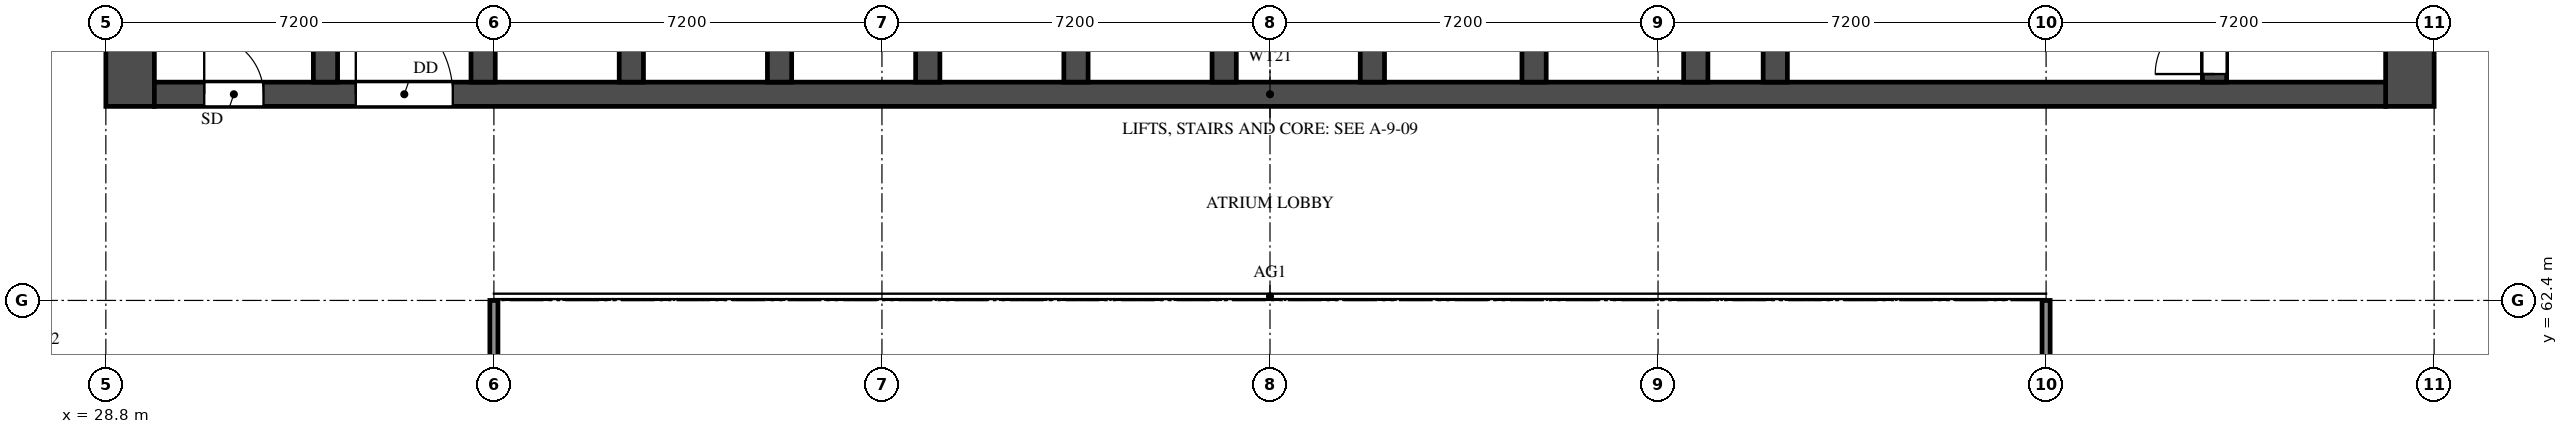
"""IFC4 building model, lengths in metres.
Left out: names, types, materials, properties, quantities, classifications, styles, units other than length and angle.
Written with IfcOpenShell. Run it as: python <this file> out.ifc"""

import sys

from ifc_helpers import new_model, si_unit, direction, frame, frame_2d, origin, place, context, subcontext, project, spatial, rectangle, extrude, element, fill, save


model = new_model("IFC4")
c1 = context("Model", 3, precision=1e-05, world=origin(), true_north=direction((0.0, 1.0)))
c2 = subcontext(c1, "Body", "Model", "MODEL_VIEW")
j1 = project(units=[si_unit("LENGTHUNIT", "METRE"), si_unit("PLANEANGLEUNIT", "RADIAN")], contexts=[c1])
p1 = place(None, origin())
s1 = spatial("IfcSite", under=j1, at=p1, CompositionType="ELEMENT")
p2 = place(p1, origin())
s2 = spatial("IfcBuilding", under=s1, at=p2, CompositionType="ELEMENT")
p3 = place(p2, frame((0.0, 0.0, 44.5)))
s3 = spatial("IfcBuildingStorey", under=s2, at=p3, CompositionType="ELEMENT", Elevation=44.5)
for number, where, z_axis, x_axis in (
    (1, (29.25, 66.0, 0.0), (0.0, 0.0, 1.0), (0.0, 1.0, 0.0)),
    (2, (71.55, 66.0, 0.0), (0.0, 0.0, 1.0), (0.0, 1.0, 0.0)),
):
    element("IfcWall", number, at=place(p3, frame(where, z_axis=z_axis, x_axis=x_axis)), inside=s3, PredefinedType="SHEAR", context=c2, shape_type="SweptSolid", body=[
        extrude(rectangle(XDim=12.0, YDim=0.9, at=frame_2d((6.0, 0.0))), origin(), (0.0, 0.0, 1.0), 3.18),
    ])
p4 = place(p3, frame((29.7, 66.225, 0.0), z_axis=(0.0, 0.0, 1.0), x_axis=(1.0, 0.0, 0.0)))
e3 = element("IfcWall", 3, at=p4, inside=s3, PredefinedType="SHEAR", context=c2, shape_type="SweptSolid", body=[
    extrude(rectangle(XDim=41.4, YDim=0.45, at=frame_2d((20.7, 0.0))), origin(), (0.0, 0.0, 1.0), 3.18),
])
p5 = place(p4, frame((0.925, 0.0, 0.0)))
e4 = element("IfcOpeningElement", 4, at=p5, cuts=e3, PredefinedType="OPENING", context=c2, shape_type="SweptSolid", body=[
    extrude(rectangle(XDim=1.1, YDim=2.1, at=frame_2d((0.55, 1.05))), frame((0.0, 0.235, 0.0), z_axis=(0.0, -1.0, 0.0), x_axis=(1.0, 0.0, 0.0)), (0.0, 0.0, 1.0), 0.47),
])
p6 = place(p4, frame((3.738, 0.0, 0.0)))
e5 = element("IfcOpeningElement", 5, at=p6, cuts=e3, PredefinedType="OPENING", context=c2, shape_type="SweptSolid", body=[
    extrude(rectangle(XDim=1.8, YDim=2.1, at=frame_2d((0.9, 1.05))), frame((0.0, 0.235, 0.0), z_axis=(0.0, -1.0, 0.0), x_axis=(1.0, 0.0, 0.0)), (0.0, 0.0, 1.0), 0.47),
])
p7 = place(p3, frame((32.875, 66.45, 0.0), z_axis=(0.0, 0.0, 1.0), x_axis=(0.0, 1.0, 0.0)))
e6 = element("IfcWall", 6, at=p7, inside=s3, PredefinedType="SHEAR", context=c2, shape_type="SweptSolid", body=[
    extrude(rectangle(XDim=10.65, YDim=0.45, at=frame_2d((5.325, 0.0))), origin(), (0.0, 0.0, 1.0), 3.18),
])
p8 = place(p3, frame((67.925, 66.45, 0.0), z_axis=(0.0, 0.0, 1.0), x_axis=(0.0, 1.0, 0.0)))
e7 = element("IfcWall", 7, at=p8, inside=s3, PredefinedType="SHEAR", context=c2, shape_type="SweptSolid", body=[
    extrude(rectangle(XDim=10.65, YDim=0.45, at=frame_2d((5.325, 0.0))), origin(), (0.0, 0.0, 1.0), 3.18),
])
p9 = place(p8, frame((0.15, 0.0, 0.0)))
e8 = element("IfcOpeningElement", 8, at=p9, cuts=e7, PredefinedType="OPENING", context=c2, shape_type="SweptSolid", body=[
    extrude(rectangle(XDim=1.1, YDim=2.1, at=frame_2d((0.55, 1.05))), frame((0.0, 0.235, 0.0), z_axis=(0.0, -1.0, 0.0), x_axis=(1.0, 0.0, 0.0)), (0.0, 0.0, 1.0), 0.47),
])
p10 = place(p3, frame((59.775, 66.45, 0.0), z_axis=(0.0, 0.0, 1.0), x_axis=(0.0, 1.0, 0.0)))
e9 = element("IfcWall", 9, at=p10, inside=s3, PredefinedType="SHEAR", context=c2, shape_type="SweptSolid", body=[
    extrude(rectangle(XDim=6.025, YDim=0.45, at=frame_2d((3.013, 0.0))), origin(), (0.0, 0.0, 1.0), 3.18),
])
p11 = place(p10, frame((3.85, 0.0, 0.0)))
e10 = element("IfcOpeningElement", 10, at=p11, cuts=e9, PredefinedType="OPENING", context=c2, shape_type="SweptSolid", body=[
    extrude(rectangle(XDim=1.2, YDim=2.1, at=frame_2d((0.6, 1.05))), frame((0.0, 0.235, 0.0), z_axis=(0.0, -1.0, 0.0), x_axis=(1.0, 0.0, 0.0)), (0.0, 0.0, 1.0), 0.47),
])
for number, where, z_axis, x_axis in (
    (11, (35.8, 66.45, 0.0), (0.0, 0.0, 1.0), (0.0, 1.0, 0.0)),
    (12, (38.55, 66.45, 0.0), (0.0, 0.0, 1.0), (0.0, 1.0, 0.0)),
    (13, (41.3, 66.45, 0.0), (0.0, 0.0, 1.0), (0.0, 1.0, 0.0)),
    (14, (44.05, 66.45, 0.0), (0.0, 0.0, 1.0), (0.0, 1.0, 0.0)),
    (15, (46.8, 66.45, 0.0), (0.0, 0.0, 1.0), (0.0, 1.0, 0.0)),
    (16, (49.55, 66.45, 0.0), (0.0, 0.0, 1.0), (0.0, 1.0, 0.0)),
    (17, (52.3, 66.45, 0.0), (0.0, 0.0, 1.0), (0.0, 1.0, 0.0)),
    (18, (55.3, 66.45, 0.0), (0.0, 0.0, 1.0), (0.0, 1.0, 0.0)),
    (19, (58.3, 66.45, 0.0), (0.0, 0.0, 1.0), (0.0, 1.0, 0.0)),
):
    element("IfcWall", number, at=place(p3, frame(where, z_axis=z_axis, x_axis=x_axis)), inside=s3, PredefinedType="SHEAR", context=c2, shape_type="SweptSolid", body=[
        extrude(rectangle(XDim=2.425, YDim=0.45, at=frame_2d((1.212, 0.0))), origin(), (0.0, 0.0, 1.0), 3.18),
    ])
for number, where, z_axis, x_axis in (
    (20, (36.0, 48.0, 0.0), (0.0, 0.0, 1.0), (0.0, 1.0, 0.0)),
    (21, (64.8, 48.0, 0.0), (0.0, 0.0, 1.0), (0.0, 1.0, 0.0)),
):
    element("IfcWall", number, at=place(p3, frame(where, z_axis=z_axis, x_axis=x_axis)), inside=s3, PredefinedType="SOLIDWALL", context=c2, shape_type="SweptSolid", body=[
        extrude(rectangle(XDim=14.4, YDim=0.15, at=frame_2d((7.2, 0.0))), origin(), (0.0, 0.0, 1.0), 2.28),
    ])
p12 = place(p5, origin())
e22 = element("IfcDoor", 22, at=p12, inside=s3, OperationType="SINGLE_SWING_LEFT", PredefinedType="DOOR", context=c2, shape_type="SweptSolid", body=[
    extrude(rectangle(XDim=1.1, YDim=2.1, at=frame_2d((0.55, 1.05))), frame((0.0, 0.025, 0.0), z_axis=(0.0, -1.0, 0.0), x_axis=(1.0, 0.0, 0.0)), (0.0, 0.0, 1.0), 0.05),
])
fill(e4, e22)
p13 = place(p9, origin())
e23 = element("IfcDoor", 23, at=p13, inside=s3, OperationType="SINGLE_SWING_LEFT", PredefinedType="DOOR", context=c2, shape_type="SweptSolid", body=[
    extrude(rectangle(XDim=1.1, YDim=2.1, at=frame_2d((0.55, 1.05))), frame((0.0, 0.025, 0.0), z_axis=(0.0, -1.0, 0.0), x_axis=(1.0, 0.0, 0.0)), (0.0, 0.0, 1.0), 0.05),
])
fill(e8, e23)
p14 = place(p6, origin())
e24 = element("IfcDoor", 24, at=p14, inside=s3, OperationType="DOUBLE_DOOR_SINGLE_SWING", PredefinedType="DOOR", context=c2, shape_type="SweptSolid", body=[
    extrude(rectangle(XDim=1.8, YDim=2.1, at=frame_2d((0.9, 1.05))), frame((0.0, 0.025, 0.0), z_axis=(0.0, -1.0, 0.0), x_axis=(1.0, 0.0, 0.0)), (0.0, 0.0, 1.0), 0.05),
])
fill(e5, e24)
save(model, sys.argv[1])
